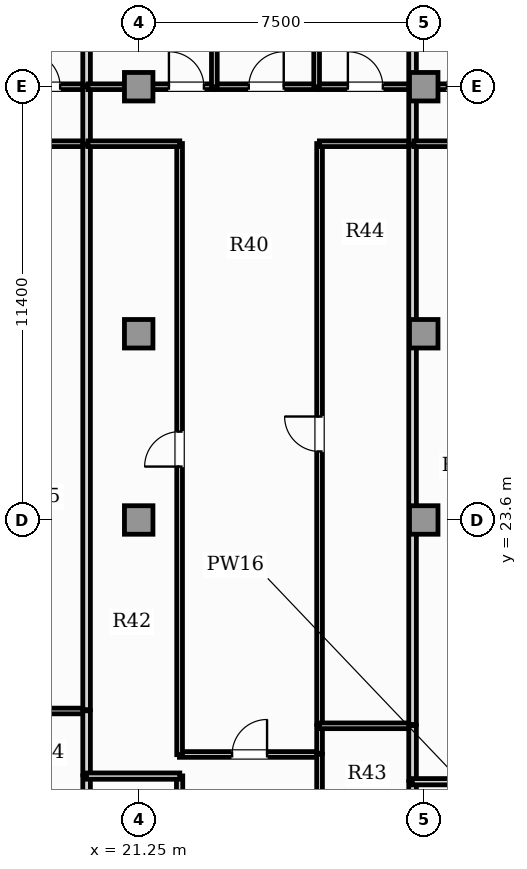
"""IFC4 building model, lengths in metres.
Left out: names, types, materials, properties, quantities, classifications, styles, units other than length and angle.
Written with IfcOpenShell. Run it as: python <this file> out.ifc"""

import sys

from ifc_helpers import new_model, si_unit, direction, frame, frame_2d, origin, origin_2d, place, context, subcontext, project, spatial, rectangle, extrude, element, fill, save


model = new_model("IFC4")
c1 = context("Model", 3, precision=1e-05, world=origin(), true_north=direction((0.0, 1.0)))
c2 = subcontext(c1, "Body", "Model", "MODEL_VIEW")
j1 = project(units=[si_unit("LENGTHUNIT", "METRE"), si_unit("PLANEANGLEUNIT", "RADIAN")], contexts=[c1])
p1 = place(None, origin())
s1 = spatial("IfcSite", under=j1, at=p1, CompositionType="ELEMENT")
p2 = place(p1, origin())
s2 = spatial("IfcBuilding", under=s1, at=p2, CompositionType="ELEMENT")
p3 = place(p2, frame((0.0, 0.0, 119.55)))
s3 = spatial("IfcBuildingStorey", under=s2, at=p3, CompositionType="ELEMENT", Elevation=119.55)
for number, where, z_axis, x_axis in (
    (1, (21.25, 23.6, 0.0), (0.0, 0.0, 1.0), (1.0, 0.0, 0.0)),
    (2, (28.75, 23.6, 0.0), (0.0, 0.0, 1.0), (1.0, 0.0, 0.0)),
    (3, (21.25, 28.5, 0.0), (0.0, 0.0, 1.0), (1.0, 0.0, 0.0)),
    (4, (28.75, 28.5, 0.0), (0.0, 0.0, 1.0), (1.0, 0.0, 0.0)),
    (5, (21.25, 35.0, 0.0), (0.0, 0.0, 1.0), (1.0, 0.0, 0.0)),
    (6, (28.75, 35.0, 0.0), (0.0, 0.0, 1.0), (1.0, 0.0, 0.0)),
):
    element("IfcColumn", number, at=place(p3, frame(where, z_axis=z_axis, x_axis=x_axis)), inside=s3, PredefinedType="COLUMN", context=c2, shape_type="SweptSolid", body=[
        extrude(rectangle(XDim=0.75, YDim=0.75, at=origin_2d()), origin(), (0.0, 0.0, 1.0), 3.85),
    ])
p4 = place(p3, frame((17.618, 33.5, 0.0), z_axis=(0.0, 0.0, 1.0), x_axis=(1.0, 0.0, 0.0)))
e7 = element("IfcWall", 7, at=p4, inside=s3, PredefinedType="PARTITIONING", context=c2, shape_type="SweptSolid", body=[
    extrude(rectangle(XDim=2.266, YDim=0.15, at=frame_2d((1.133, 0.0))), origin(), (0.0, 0.0, 1.0), 3.6),
])
p5 = place(p3, frame((17.562, 35.0, 0.0), z_axis=(0.0, 0.0, 1.0), x_axis=(1.0, 0.0, 0.0)))
e8 = element("IfcWall", 8, at=p5, inside=s3, PredefinedType="PARTITIONING", context=c2, shape_type="SweptSolid", body=[
    extrude(rectangle(XDim=2.323, YDim=0.15, at=frame_2d((1.161, 0.0))), origin(), (0.0, 0.0, 1.0), 2.983),
])
p6 = place(p5, frame((0.701, 0.0, 0.0)))
e9 = element("IfcOpeningElement", 9, at=p6, cuts=e8, PredefinedType="OPENING", context=c2, shape_type="SweptSolid", body=[
    extrude(rectangle(XDim=0.92, YDim=2.1, at=frame_2d((0.46, 1.05))), frame((0.0, 0.085, 0.0), z_axis=(0.0, -1.0, 0.0), x_axis=(1.0, 0.0, 0.0)), (0.0, 0.0, 1.0), 0.17),
])
p7 = place(p3, frame((19.879, 33.495, 0.0), z_axis=(0.0, 0.0, 1.0), x_axis=(0.0, 1.0, 0.0)))
e10 = element("IfcWall", 10, at=p7, inside=s3, PredefinedType="PARTITIONING", context=c2, shape_type="SweptSolid", body=[
    extrude(rectangle(XDim=1.51, YDim=0.2, at=frame_2d((0.755, 0.0))), origin(), (0.0, 0.0, 1.0), 3.6),
])
p8 = place(p3, frame((17.618, 18.574, 0.0), z_axis=(0.0, 0.0, 1.0), x_axis=(1.0, 0.0, 0.0)))
e11 = element("IfcWall", 11, at=p8, inside=s3, PredefinedType="PARTITIONING", context=c2, shape_type="SweptSolid", body=[
    extrude(rectangle(XDim=2.266, YDim=0.15, at=frame_2d((1.133, 0.0))), origin(), (0.0, 0.0, 1.0), 3.6),
])
p9 = place(p3, frame((19.879, 13.765, 0.0), z_axis=(0.0, 0.0, 1.0), x_axis=(0.0, 1.0, 0.0)))
e12 = element("IfcWall", 12, at=p9, inside=s3, PredefinedType="PARTITIONING", context=c2, shape_type="SweptSolid", body=[
    extrude(rectangle(XDim=3.101, YDim=0.2, at=frame_2d((1.551, 0.0))), origin(), (0.0, 0.0, 1.0), 3.6),
])
p10 = place(p3, frame((19.879, 16.896, 0.0), z_axis=(0.0, 0.0, 1.0), x_axis=(0.0, 1.0, 0.0)))
e13 = element("IfcWall", 13, at=p10, inside=s3, PredefinedType="PARTITIONING", context=c2, shape_type="SweptSolid", body=[
    extrude(rectangle(XDim=1.683, YDim=0.2, at=frame_2d((0.842, 0.0))), origin(), (0.0, 0.0, 1.0), 3.6),
])
p11 = place(p3, frame((19.879, 18.609, 0.0), z_axis=(0.0, 0.0, 1.0), x_axis=(0.0, 1.0, 0.0)))
e14 = element("IfcWall", 14, at=p11, inside=s3, PredefinedType="PARTITIONING", context=c2, shape_type="SweptSolid", body=[
    extrude(rectangle(XDim=14.856, YDim=0.2, at=frame_2d((7.428, 0.0))), origin(), (0.0, 0.0, 1.0), 3.6),
])
p12 = place(p3, frame((19.879, 35.035, 0.0), z_axis=(0.0, 0.0, 1.0), x_axis=(0.0, 1.0, 0.0)))
e15 = element("IfcWall", 15, at=p12, inside=s3, PredefinedType="PARTITIONING", context=c2, shape_type="SweptSolid", body=[
    extrude(rectangle(XDim=7.955, YDim=0.2, at=frame_2d((3.978, 0.0))), origin(), (0.0, 0.0, 1.0), 3.6),
])
p13 = place(p3, frame((22.321, 17.43, 0.0), z_axis=(0.0, 0.0, 1.0), x_axis=(1.0, 0.0, 0.0)))
e16 = element("IfcWall", 16, at=p13, inside=s3, PredefinedType="PARTITIONING", context=c2, shape_type="SweptSolid", body=[
    extrude(rectangle(XDim=3.693, YDim=0.15, at=frame_2d((1.846, 0.0))), origin(), (0.0, 0.0, 1.0), 3.6),
])
p14 = place(p13, frame((1.386, 0.0, 0.0)))
e17 = element("IfcOpeningElement", 17, at=p14, cuts=e16, PredefinedType="OPENING", context=c2, shape_type="SweptSolid", body=[
    extrude(rectangle(XDim=0.92, YDim=2.1, at=frame_2d((0.46, 1.05))), frame((0.0, 0.085, 0.0), z_axis=(0.0, -1.0, 0.0), x_axis=(1.0, 0.0, 0.0)), (0.0, 0.0, 1.0), 0.17),
])
p15 = place(p3, frame((22.326, 13.765, 0.0), z_axis=(0.0, 0.0, 1.0), x_axis=(0.0, 1.0, 0.0)))
e18 = element("IfcWall", 18, at=p15, inside=s3, PredefinedType="PLUMBINGWALL", context=c2, shape_type="SweptSolid", body=[
    extrude(rectangle(XDim=3.101, YDim=0.165, at=frame_2d((1.551, 0.0))), origin(), (0.0, 0.0, 1.0), 3.6),
])
p16 = place(p15, frame((1.125, 0.0, 0.0)))
e19 = element("IfcOpeningElement", 19, at=p16, cuts=e18, PredefinedType="OPENING", context=c2, shape_type="SweptSolid", body=[
    extrude(rectangle(XDim=0.85, YDim=2.1, at=frame_2d((0.425, 1.05))), frame((0.0, 0.093, 0.0), z_axis=(0.0, -1.0, 0.0), x_axis=(1.0, 0.0, 0.0)), (0.0, 0.0, 1.0), 0.185),
])
p17 = place(p3, frame((26.009, 13.765, 0.0), z_axis=(0.0, 0.0, 1.0), x_axis=(0.0, 1.0, 0.0)))
e20 = element("IfcWall", 20, at=p17, inside=s3, PredefinedType="PARTITIONING", context=c2, shape_type="SweptSolid", body=[
    extrude(rectangle(XDim=3.67, YDim=0.15, at=frame_2d((1.835, 0.0))), origin(), (0.0, 0.0, 1.0), 3.6),
])
p18 = place(p17, frame((1.375, 0.0, 0.0)))
e21 = element("IfcOpeningElement", 21, at=p18, cuts=e20, PredefinedType="OPENING", context=c2, shape_type="SweptSolid", body=[
    extrude(rectangle(XDim=0.92, YDim=2.1, at=frame_2d((0.46, 1.05))), frame((0.0, 0.085, 0.0), z_axis=(0.0, -1.0, 0.0), x_axis=(1.0, 0.0, 0.0)), (0.0, 0.0, 1.0), 0.17),
])
p19 = place(p3, frame((22.326, 17.425, 0.0), z_axis=(0.0, 0.0, 1.0), x_axis=(0.0, 1.0, 0.0)))
e22 = element("IfcWall", 22, at=p19, inside=s3, PredefinedType="PARTITIONING", context=c2, shape_type="SweptSolid", body=[
    extrude(rectangle(XDim=16.08, YDim=0.15, at=frame_2d((8.04, 0.0))), origin(), (0.0, 0.0, 1.0), 3.6),
])
p20 = place(p19, frame((7.58, 0.0, 0.0)))
e23 = element("IfcOpeningElement", 23, at=p20, cuts=e22, PredefinedType="OPENING", context=c2, shape_type="SweptSolid", body=[
    extrude(rectangle(XDim=0.92, YDim=2.1, at=frame_2d((0.46, 1.05))), frame((0.0, 0.085, 0.0), z_axis=(0.0, -1.0, 0.0), x_axis=(1.0, 0.0, 0.0)), (0.0, 0.0, 1.0), 0.17),
])
p21 = place(p3, frame((19.914, 33.5, 0.0), z_axis=(0.0, 0.0, 1.0), x_axis=(1.0, 0.0, 0.0)))
e24 = element("IfcWall", 24, at=p21, inside=s3, PredefinedType="PARTITIONING", context=c2, shape_type="SweptSolid", body=[
    extrude(rectangle(XDim=2.417, YDim=0.15, at=frame_2d((1.208, 0.0))), origin(), (0.0, 0.0, 1.0), 3.6),
])
p22 = place(p3, frame((26.009, 17.465, 0.0), z_axis=(0.0, 0.0, 1.0), x_axis=(0.0, 1.0, 0.0)))
e25 = element("IfcWall", 25, at=p22, inside=s3, PredefinedType="PARTITIONING", context=c2, shape_type="SweptSolid", body=[
    extrude(rectangle(XDim=0.724, YDim=0.15, at=frame_2d((0.362, 0.0))), origin(), (0.0, 0.0, 1.0), 3.6),
])
p23 = place(p3, frame((26.009, 18.219, 0.0), z_axis=(0.0, 0.0, 1.0), x_axis=(0.0, 1.0, 0.0)))
e26 = element("IfcWall", 26, at=p23, inside=s3, PredefinedType="PARTITIONING", context=c2, shape_type="SweptSolid", body=[
    extrude(rectangle(XDim=15.285, YDim=0.15, at=frame_2d((7.643, 0.0))), origin(), (0.0, 0.0, 1.0), 3.6),
])
p24 = place(p23, frame((7.183, 0.0, 0.0)))
e27 = element("IfcOpeningElement", 27, at=p24, cuts=e26, PredefinedType="OPENING", context=c2, shape_type="SweptSolid", body=[
    extrude(rectangle(XDim=0.92, YDim=2.1, at=frame_2d((0.46, 1.05))), frame((0.0, 0.085, 0.0), z_axis=(0.0, -1.0, 0.0), x_axis=(1.0, 0.0, 0.0)), (0.0, 0.0, 1.0), 0.17),
])
p25 = place(p3, frame((26.004, 33.5, 0.0), z_axis=(0.0, 0.0, 1.0), x_axis=(1.0, 0.0, 0.0)))
e28 = element("IfcWall", 28, at=p25, inside=s3, PredefinedType="PARTITIONING", context=c2, shape_type="SweptSolid", body=[
    extrude(rectangle(XDim=2.457, YDim=0.15, at=frame_2d((1.229, 0.0))), origin(), (0.0, 0.0, 1.0), 3.6),
])
p26 = place(p3, frame((19.914, 35.0, 0.0), z_axis=(0.0, 0.0, 1.0), x_axis=(1.0, 0.0, 0.0)))
e29 = element("IfcWall", 29, at=p26, inside=s3, PredefinedType="PARTITIONING", context=c2, shape_type="SweptSolid", body=[
    extrude(rectangle(XDim=3.331, YDim=0.15, at=frame_2d((1.666, 0.0))), origin(), (0.0, 0.0, 1.0), 2.983),
])
p27 = place(p26, frame((2.131, 0.0, 0.0)))
e30 = element("IfcOpeningElement", 30, at=p27, cuts=e29, PredefinedType="OPENING", context=c2, shape_type="SweptSolid", body=[
    extrude(rectangle(XDim=0.92, YDim=2.1, at=frame_2d((0.46, 1.05))), frame((0.0, 0.085, 0.0), z_axis=(0.0, -1.0, 0.0), x_axis=(1.0, 0.0, 0.0)), (0.0, 0.0, 1.0), 0.17),
])
p28 = place(p3, frame((23.275, 35.0, 0.0), z_axis=(0.0, 0.0, 1.0), x_axis=(1.0, 0.0, 0.0)))
e31 = element("IfcWall", 31, at=p28, inside=s3, PredefinedType="PARTITIONING", context=c2, shape_type="SweptSolid", body=[
    extrude(rectangle(XDim=2.662, YDim=0.15, at=frame_2d((1.331, 0.0))), origin(), (0.0, 0.0, 1.0), 2.983),
])
p29 = place(p28, frame((0.871, 0.0, 0.0)))
e32 = element("IfcOpeningElement", 32, at=p29, cuts=e31, PredefinedType="OPENING", context=c2, shape_type="SweptSolid", body=[
    extrude(rectangle(XDim=0.92, YDim=2.1, at=frame_2d((0.46, 1.05))), frame((0.0, 0.085, 0.0), z_axis=(0.0, -1.0, 0.0), x_axis=(1.0, 0.0, 0.0)), (0.0, 0.0, 1.0), 0.17),
])
p30 = place(p3, frame((25.967, 35.0, 0.0), z_axis=(0.0, 0.0, 1.0), x_axis=(1.0, 0.0, 0.0)))
e33 = element("IfcWall", 33, at=p30, inside=s3, PredefinedType="PARTITIONING", context=c2, shape_type="SweptSolid", body=[
    extrude(rectangle(XDim=2.494, YDim=0.15, at=frame_2d((1.247, 0.0))), origin(), (0.0, 0.0, 1.0), 2.983),
])
p31 = place(p30, frame((0.787, 0.0, 0.0)))
e34 = element("IfcOpeningElement", 34, at=p31, cuts=e33, PredefinedType="OPENING", context=c2, shape_type="SweptSolid", body=[
    extrude(rectangle(XDim=0.92, YDim=2.1, at=frame_2d((0.46, 1.05))), frame((0.0, 0.085, 0.0), z_axis=(0.0, -1.0, 0.0), x_axis=(1.0, 0.0, 0.0)), (0.0, 0.0, 1.0), 0.17),
])
p32 = place(p3, frame((28.456, 33.495, 0.0), z_axis=(0.0, 0.0, 1.0), x_axis=(0.0, 1.0, 0.0)))
e35 = element("IfcWall", 35, at=p32, inside=s3, PredefinedType="PARTITIONING", context=c2, shape_type="SweptSolid", body=[
    extrude(rectangle(XDim=1.51, YDim=0.2, at=frame_2d((0.755, 0.0))), origin(), (0.0, 0.0, 1.0), 3.6),
])
p33 = place(p3, frame((19.874, 16.861, 0.0), z_axis=(0.0, 0.0, 1.0), x_axis=(1.0, 0.0, 0.0)))
e36 = element("IfcWall", 36, at=p33, inside=s3, PredefinedType="PLUMBINGWALL", context=c2, shape_type="SweptSolid", body=[
    extrude(rectangle(XDim=2.457, YDim=0.165, at=frame_2d((1.229, 0.0))), origin(), (0.0, 0.0, 1.0), 3.6),
])
p34 = place(p3, frame((26.004, 18.185, 0.0), z_axis=(0.0, 0.0, 1.0), x_axis=(1.0, 0.0, 0.0)))
e37 = element("IfcWall", 37, at=p34, inside=s3, PredefinedType="PARTITIONING", context=c2, shape_type="SweptSolid", body=[
    extrude(rectangle(XDim=2.457, YDim=0.15, at=frame_2d((1.229, 0.0))), origin(), (0.0, 0.0, 1.0), 3.6),
])
p35 = place(p3, frame((28.456, 13.765, 0.0), z_axis=(0.0, 0.0, 1.0), x_axis=(0.0, 1.0, 0.0)))
e38 = element("IfcWall", 38, at=p35, inside=s3, PredefinedType="PARTITIONING", context=c2, shape_type="SweptSolid", body=[
    extrude(rectangle(XDim=2.953, YDim=0.2, at=frame_2d((1.477, 0.0))), origin(), (0.0, 0.0, 1.0), 3.6),
])
p36 = place(p3, frame((28.456, 16.748, 0.0), z_axis=(0.0, 0.0, 1.0), x_axis=(0.0, 1.0, 0.0)))
e39 = element("IfcWall", 39, at=p36, inside=s3, PredefinedType="PARTITIONING", context=c2, shape_type="SweptSolid", body=[
    extrude(rectangle(XDim=1.441, YDim=0.2, at=frame_2d((0.721, 0.0))), origin(), (0.0, 0.0, 1.0), 3.6),
])
p37 = place(p3, frame((28.456, 18.219, 0.0), z_axis=(0.0, 0.0, 1.0), x_axis=(0.0, 1.0, 0.0)))
e40 = element("IfcWall", 40, at=p37, inside=s3, PredefinedType="PARTITIONING", context=c2, shape_type="SweptSolid", body=[
    extrude(rectangle(XDim=15.246, YDim=0.2, at=frame_2d((7.623, 0.0))), origin(), (0.0, 0.0, 1.0), 3.6),
])
for number, where, z_axis, x_axis in (
    (41, (23.24, 34.995, 0.0), (0.0, 0.0, 1.0), (0.0, 1.0, 0.0)),
    (42, (25.932, 34.995, 0.0), (0.0, 0.0, 1.0), (0.0, 1.0, 0.0)),
):
    element("IfcWall", number, at=place(p3, frame(where, z_axis=z_axis, x_axis=x_axis)), inside=s3, PredefinedType="PARTITIONING", context=c2, shape_type="SweptSolid", body=[
        extrude(rectangle(XDim=7.995, YDim=0.15, at=frame_2d((3.998, 0.0))), origin(), (0.0, 0.0, 1.0), 3.6),
    ])
p38 = place(p3, frame((28.456, 35.035, 0.0), z_axis=(0.0, 0.0, 1.0), x_axis=(0.0, 1.0, 0.0)))
e43 = element("IfcWall", 43, at=p38, inside=s3, PredefinedType="PARTITIONING", context=c2, shape_type="SweptSolid", body=[
    extrude(rectangle(XDim=7.955, YDim=0.2, at=frame_2d((3.978, 0.0))), origin(), (0.0, 0.0, 1.0), 3.6),
])
p39 = place(p3, frame((28.491, 33.5, 0.0), z_axis=(0.0, 0.0, 1.0), x_axis=(1.0, 0.0, 0.0)))
e44 = element("IfcWall", 44, at=p39, inside=s3, PredefinedType="PARTITIONING", context=c2, shape_type="SweptSolid", body=[
    extrude(rectangle(XDim=2.538, YDim=0.15, at=frame_2d((1.269, 0.0))), origin(), (0.0, 0.0, 1.0), 3.6),
])
p40 = place(p3, frame((28.491, 35.0, 0.0), z_axis=(0.0, 0.0, 1.0), x_axis=(1.0, 0.0, 0.0)))
e45 = element("IfcWall", 45, at=p40, inside=s3, PredefinedType="PARTITIONING", context=c2, shape_type="SweptSolid", body=[
    extrude(rectangle(XDim=2.657, YDim=0.15, at=frame_2d((1.329, 0.0))), origin(), (0.0, 0.0, 1.0), 2.983),
])
p41 = place(p40, frame((0.868, 0.0, 0.0)))
e46 = element("IfcOpeningElement", 46, at=p41, cuts=e45, PredefinedType="OPENING", context=c2, shape_type="SweptSolid", body=[
    extrude(rectangle(XDim=0.92, YDim=2.1, at=frame_2d((0.46, 1.05))), frame((0.0, 0.085, 0.0), z_axis=(0.0, -1.0, 0.0), x_axis=(1.0, 0.0, 0.0)), (0.0, 0.0, 1.0), 0.17),
])
p42 = place(p3, frame((28.451, 16.713, 0.0), z_axis=(0.0, 0.0, 1.0), x_axis=(1.0, 0.0, 0.0)))
e47 = element("IfcWall", 47, at=p42, inside=s3, PredefinedType="PLUMBINGWALL", context=c2, shape_type="SweptSolid", body=[
    extrude(rectangle(XDim=2.578, YDim=0.165, at=frame_2d((1.289, 0.0))), origin(), (0.0, 0.0, 1.0), 3.6),
])
p43 = place(p6, origin())
e48 = element("IfcDoor", 48, at=p43, inside=s3, OperationType="SINGLE_SWING_LEFT", PredefinedType="DOOR", context=c2, shape_type="SweptSolid", body=[
    extrude(rectangle(XDim=0.92, YDim=2.1, at=frame_2d((0.46, 1.05))), frame((0.0, 0.025, 0.0), z_axis=(0.0, -1.0, 0.0), x_axis=(1.0, 0.0, 0.0)), (0.0, 0.0, 1.0), 0.05),
])
fill(e9, e48)
p44 = place(p14, origin())
e49 = element("IfcDoor", 49, at=p44, inside=s3, OperationType="SINGLE_SWING_RIGHT", PredefinedType="DOOR", context=c2, shape_type="SweptSolid", body=[
    extrude(rectangle(XDim=0.92, YDim=2.1, at=frame_2d((0.46, 1.05))), frame((0.0, 0.025, 0.0), z_axis=(0.0, -1.0, 0.0), x_axis=(1.0, 0.0, 0.0)), (0.0, 0.0, 1.0), 0.05),
])
fill(e17, e49)
p45 = place(p20, origin())
e50 = element("IfcDoor", 50, at=p45, inside=s3, OperationType="SINGLE_SWING_LEFT", PredefinedType="DOOR", context=c2, shape_type="SweptSolid", body=[
    extrude(rectangle(XDim=0.92, YDim=2.1, at=frame_2d((0.46, 1.05))), frame((0.0, 0.025, 0.0), z_axis=(0.0, -1.0, 0.0), x_axis=(1.0, 0.0, 0.0)), (0.0, 0.0, 1.0), 0.05),
])
fill(e23, e50)
p46 = place(p24, origin())
e51 = element("IfcDoor", 51, at=p46, inside=s3, OperationType="SINGLE_SWING_RIGHT", PredefinedType="DOOR", context=c2, shape_type="SweptSolid", body=[
    extrude(rectangle(XDim=0.92, YDim=2.1, at=frame_2d((0.46, 1.05))), frame((0.0, 0.025, 0.0), z_axis=(0.0, -1.0, 0.0), x_axis=(1.0, 0.0, 0.0)), (0.0, 0.0, 1.0), 0.05),
])
fill(e27, e51)
p47 = place(p27, origin())
e52 = element("IfcDoor", 52, at=p47, inside=s3, OperationType="SINGLE_SWING_LEFT", PredefinedType="DOOR", context=c2, shape_type="SweptSolid", body=[
    extrude(rectangle(XDim=0.92, YDim=2.1, at=frame_2d((0.46, 1.05))), frame((0.0, 0.025, 0.0), z_axis=(0.0, -1.0, 0.0), x_axis=(1.0, 0.0, 0.0)), (0.0, 0.0, 1.0), 0.05),
])
fill(e30, e52)
p48 = place(p29, origin())
e53 = element("IfcDoor", 53, at=p48, inside=s3, OperationType="SINGLE_SWING_RIGHT", PredefinedType="DOOR", context=c2, shape_type="SweptSolid", body=[
    extrude(rectangle(XDim=0.92, YDim=2.1, at=frame_2d((0.46, 1.05))), frame((0.0, 0.025, 0.0), z_axis=(0.0, -1.0, 0.0), x_axis=(1.0, 0.0, 0.0)), (0.0, 0.0, 1.0), 0.05),
])
fill(e32, e53)
p49 = place(p31, origin())
e54 = element("IfcDoor", 54, at=p49, inside=s3, OperationType="SINGLE_SWING_LEFT", PredefinedType="DOOR", context=c2, shape_type="SweptSolid", body=[
    extrude(rectangle(XDim=0.92, YDim=2.1, at=frame_2d((0.46, 1.05))), frame((0.0, 0.025, 0.0), z_axis=(0.0, -1.0, 0.0), x_axis=(1.0, 0.0, 0.0)), (0.0, 0.0, 1.0), 0.05),
])
fill(e34, e54)
p50 = place(p41, origin())
e55 = element("IfcDoor", 55, at=p50, inside=s3, OperationType="SINGLE_SWING_RIGHT", PredefinedType="DOOR", context=c2, shape_type="SweptSolid", body=[
    extrude(rectangle(XDim=0.92, YDim=2.1, at=frame_2d((0.46, 1.05))), frame((0.0, 0.025, 0.0), z_axis=(0.0, -1.0, 0.0), x_axis=(1.0, 0.0, 0.0)), (0.0, 0.0, 1.0), 0.05),
])
fill(e46, e55)
save(model, sys.argv[1])
